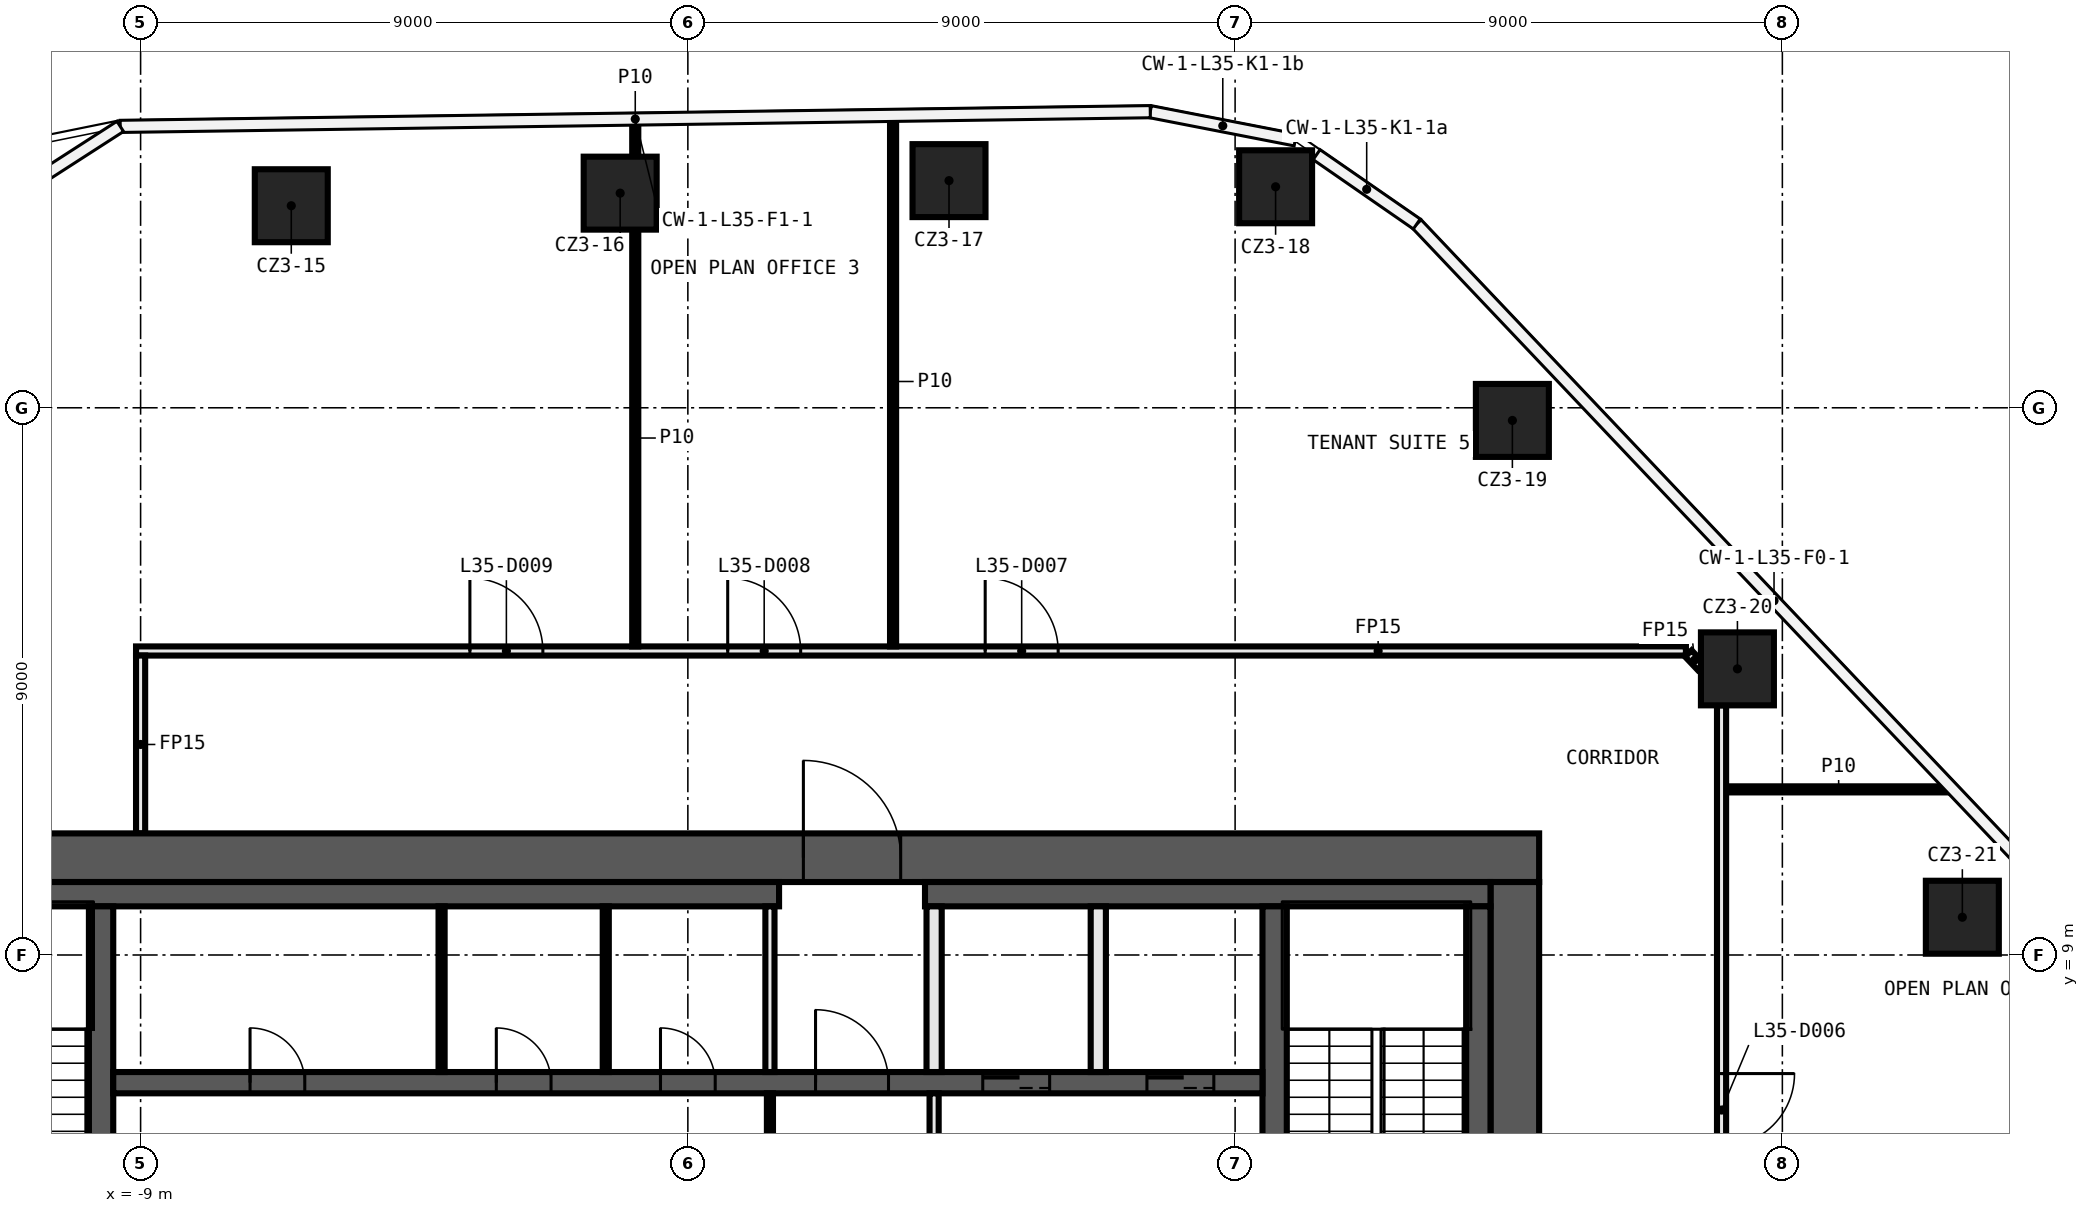
"""IFC4 building model, lengths in metres.
Left out: names, types, materials, properties, quantities, classifications, styles, units other than length and angle.
Written with IfcOpenShell. Run it as: python <this file> out.ifc"""

import sys

from ifc_helpers import new_model, si_unit, direction, frame, frame_2d, origin, origin_2d, place, context, subcontext, project, spatial, rectangle, extrude, element, fill, save


model = new_model("IFC4")
c1 = context("Model", 3, precision=1e-05, world=origin(), true_north=direction((0.0, 1.0)))
c2 = subcontext(c1, "Body", "Model", "MODEL_VIEW")
j1 = project(units=[si_unit("LENGTHUNIT", "METRE"), si_unit("PLANEANGLEUNIT", "RADIAN")], contexts=[c1])
p1 = place(None, origin())
s1 = spatial("IfcSite", under=j1, at=p1, CompositionType="ELEMENT")
p2 = place(p1, origin())
s2 = spatial("IfcBuilding", under=s1, at=p2, CompositionType="ELEMENT")
p3 = place(p2, frame((0.0, 0.0, 162.8)))
s3 = spatial("IfcBuildingStorey", under=s2, at=p3, CompositionType="ELEMENT", Elevation=162.8)
for number, where, z_axis, x_axis in (
    (1, (-6.522, 21.323, 0.0), (0.0, 0.0, 1.0), (1.0, 0.0, 0.0)),
    (2, (-1.113, 21.53, 0.0), (0.0, 0.0, 1.0), (1.0, 0.0, 0.0)),
    (3, (4.295, 21.736, 0.0), (0.0, 0.0, 1.0), (1.0, 0.0, 0.0)),
    (4, (9.666, 21.635, 0.0), (0.0, 0.0, 1.0), (1.0, 0.0, 0.0)),
    (5, (13.56, 17.792, 0.0), (0.0, 0.0, 1.0), (1.0, 0.0, 0.0)),
    (6, (17.261, 13.706, 0.0), (0.0, 0.0, 1.0), (1.0, 0.0, 0.0)),
    (7, (20.96, 9.621, 0.0), (0.0, 0.0, 1.0), (1.0, 0.0, 0.0)),
):
    element("IfcColumn", number, at=place(p3, frame(where, z_axis=z_axis, x_axis=x_axis)), inside=s3, PredefinedType="COLUMN", context=c2, shape_type="SweptSolid", body=[
        extrude(rectangle(XDim=1.2, YDim=1.2, at=origin_2d()), origin(), (0.0, 0.0, 1.0), 3.82),
    ])
p4 = place(p3, frame((17.075, 11.724, 0.0), z_axis=(0.0, 0.0, 1.0), x_axis=(1.0, 0.0, 0.0)))
e8 = element("IfcWall", 8, at=p4, inside=s3, PredefinedType="PARTITIONING", context=c2, shape_type="SweptSolid", body=[
    extrude(rectangle(XDim=3.701, YDim=0.1, at=frame_2d((1.851, 0.0))), origin(), (0.0, 0.0, 1.0), 3.82),
])
p5 = place(p3, frame((-9.075, 14.0, 0.0), z_axis=(0.0, 0.0, 1.0), x_axis=(1.0, 0.0, 0.0)))
e9 = element("IfcWall", 9, at=p5, inside=s3, PredefinedType="PARTITIONING", context=c2, shape_type="SweptSolid", body=[
    extrude(rectangle(XDim=25.489, YDim=0.15, at=frame_2d((12.745, 0.0))), origin(), (0.0, 0.0, 1.0), 3.82),
])
p6 = place(p5, frame((13.965, 0.0, 0.0)))
e10 = element("IfcOpeningElement", 10, at=p6, cuts=e9, PredefinedType="OPENING", context=c2, shape_type="SweptSolid", body=[
    extrude(rectangle(XDim=1.2, YDim=2.1, at=frame_2d((0.6, 1.05))), frame((0.0, 0.085, 0.0), z_axis=(0.0, -1.0, 0.0), x_axis=(1.0, 0.0, 0.0)), (0.0, 0.0, 1.0), 0.17),
])
p7 = place(p5, frame((9.73, 0.0, 0.0)))
e11 = element("IfcOpeningElement", 11, at=p7, cuts=e9, PredefinedType="OPENING", context=c2, shape_type="SweptSolid", body=[
    extrude(rectangle(XDim=1.2, YDim=2.1, at=frame_2d((0.6, 1.05))), frame((0.0, 0.085, 0.0), z_axis=(0.0, -1.0, 0.0), x_axis=(1.0, 0.0, 0.0)), (0.0, 0.0, 1.0), 0.17),
])
p8 = place(p5, frame((5.49, 0.0, 0.0)))
e12 = element("IfcOpeningElement", 12, at=p8, cuts=e9, PredefinedType="OPENING", context=c2, shape_type="SweptSolid", body=[
    extrude(rectangle(XDim=1.2, YDim=2.1, at=frame_2d((0.6, 1.05))), frame((0.0, 0.085, 0.0), z_axis=(0.0, -1.0, 0.0), x_axis=(1.0, 0.0, 0.0)), (0.0, 0.0, 1.0), 0.17),
])
p9 = place(p3, frame((17.0, 13.106, 0.0), z_axis=(0.0, 0.0, 1.0), x_axis=(0.0, -1.0, 0.0)))
e13 = element("IfcWall", 13, at=p9, inside=s3, PredefinedType="PARTITIONING", context=c2, shape_type="SweptSolid", body=[
    extrude(rectangle(XDim=23.172, YDim=0.15, at=frame_2d((11.586, 0.0))), origin(), (0.0, 0.0, 1.0), 3.82),
])
p10 = place(p9, frame((11.492, 0.0, 0.0)))
e14 = element("IfcOpeningElement", 14, at=p10, cuts=e13, PredefinedType="OPENING", context=c2, shape_type="SweptSolid", body=[
    extrude(rectangle(XDim=1.2, YDim=2.1, at=frame_2d((0.6, 1.05))), frame((0.0, 0.085, 0.0), z_axis=(0.0, -1.0, 0.0), x_axis=(1.0, 0.0, 0.0)), (0.0, 0.0, 1.0), 0.17),
])
p11 = place(p9, frame((6.056, 0.0, 0.0)))
e15 = element("IfcOpeningElement", 15, at=p11, cuts=e13, PredefinedType="OPENING", context=c2, shape_type="SweptSolid", body=[
    extrude(rectangle(XDim=1.2, YDim=2.1, at=frame_2d((0.6, 1.05))), frame((0.0, 0.085, 0.0), z_axis=(0.0, -1.0, 0.0), x_axis=(1.0, 0.0, 0.0)), (0.0, 0.0, 1.0), 0.17),
])
p12 = place(p3, frame((3.375, 14.075, 0.0), z_axis=(0.0, 0.0, 1.0), x_axis=(0.0, 1.0, 0.0)))
e16 = element("IfcWall", 16, at=p12, inside=s3, PredefinedType="PARTITIONING", context=c2, shape_type="SweptSolid", body=[
    extrude(rectangle(XDim=8.715, YDim=0.1, at=frame_2d((4.357, 0.0))), origin(), (0.0, 0.0, 1.0), 3.82),
])
p13 = place(p3, frame((-0.865, 14.075, 0.0), z_axis=(0.0, 0.0, 1.0), x_axis=(0.0, 1.0, 0.0)))
e17 = element("IfcWall", 17, at=p13, inside=s3, PredefinedType="PARTITIONING", context=c2, shape_type="SweptSolid", body=[
    extrude(rectangle(XDim=6.855, YDim=0.1, at=frame_2d((3.427, 0.0))), origin(), (0.0, 0.0, 1.0), 3.82),
])
p14 = place(p3, frame((-0.865, 22.13, 0.0), z_axis=(0.0, 0.0, 1.0), x_axis=(0.0, 1.0, 0.0)))
e18 = element("IfcWall", 18, at=p14, inside=s3, PredefinedType="PARTITIONING", context=c2, shape_type="SweptSolid", body=[
    extrude(rectangle(XDim=0.599, YDim=0.1, at=frame_2d((0.3, 0.0))), origin(), (0.0, 0.0, 1.0), 3.82),
])
p15 = place(p3, frame((-9.0, 11.0, 0.0), z_axis=(0.0, 0.0, 1.0), x_axis=(0.0, 1.0, 0.0)))
e19 = element("IfcWall", 19, at=p15, inside=s3, PredefinedType="PARTITIONING", context=c2, shape_type="SweptSolid", body=[
    extrude(rectangle(XDim=2.925, YDim=0.15, at=frame_2d((1.462, 0.0))), origin(), (0.0, 0.0, 1.0), 3.82),
])
p16 = place(p3, frame((16.453, 13.959, 0.0), z_axis=(0.0, 0.0, 1.0), x_axis=(0.687856738642, -0.725846476264, 0.0)))
e20 = element("IfcWall", 20, at=p16, inside=s3, PredefinedType="PARTITIONING", context=c2, shape_type="SweptSolid", body=[
    extrude(rectangle(XDim=0.302, YDim=0.15, at=frame_2d((0.151, 0.0))), origin(), (0.0, 0.0, 1.0), 3.82),
])
p17 = place(p3, frame((-14.0, 10.6, 0.0), z_axis=(0.0, 0.0, 1.0), x_axis=(1.0, 0.0, 0.0)))
e21 = element("IfcWall", 21, at=p17, inside=s3, PredefinedType="SHEAR", context=c2, shape_type="SweptSolid", body=[
    extrude(rectangle(XDim=28.0, YDim=0.8, at=frame_2d((14.0, 0.0))), origin(), (0.0, 0.0, 1.0), 3.82),
])
p18 = place(p17, frame((15.9, 0.0, 0.0)))
e22 = element("IfcOpeningElement", 22, at=p18, cuts=e21, PredefinedType="OPENING", context=c2, shape_type="SweptSolid", body=[
    extrude(rectangle(XDim=1.6, YDim=2.1, at=frame_2d((0.8, 1.05))), frame((0.0, 0.41, 0.0), z_axis=(0.0, -1.0, 0.0), x_axis=(1.0, 0.0, 0.0)), (0.0, 0.0, 1.0), 0.82),
])
p19 = place(p3, frame((13.6, 10.2, 0.0), z_axis=(0.0, 0.0, 1.0), x_axis=(0.0, -1.0, 0.0)))
e23 = element("IfcWall", 23, at=p19, inside=s3, PredefinedType="SHEAR", context=c2, shape_type="SweptSolid", body=[
    extrude(rectangle(XDim=20.4, YDim=0.8, at=frame_2d((10.2, 0.0))), origin(), (0.0, 0.0, 1.0), 3.82),
])
p20 = place(p3, frame((-13.2, 10.0, 0.0), z_axis=(0.0, 0.0, 1.0), x_axis=(1.0, 0.0, 0.0)))
e24 = element("IfcWall", 24, at=p20, inside=s3, PredefinedType="SHEAR", context=c2, shape_type="SweptSolid", body=[
    extrude(rectangle(XDim=14.7, YDim=0.4, at=frame_2d((7.35, 0.0))), origin(), (0.0, 0.0, 1.0), 3.82),
])
p21 = place(p3, frame((3.9, 10.0, 0.0), z_axis=(0.0, 0.0, 1.0), x_axis=(1.0, 0.0, 0.0)))
e25 = element("IfcWall", 25, at=p21, inside=s3, PredefinedType="SHEAR", context=c2, shape_type="SweptSolid", body=[
    extrude(rectangle(XDim=9.3, YDim=0.4, at=frame_2d((4.65, 0.0))), origin(), (0.0, 0.0, 1.0), 3.82),
])
p22 = place(p3, frame((13.0, 9.8, 0.0), z_axis=(0.0, 0.0, 1.0), x_axis=(0.0, -1.0, 0.0)))
e26 = element("IfcWall", 26, at=p22, inside=s3, PredefinedType="SHEAR", context=c2, shape_type="SweptSolid", body=[
    extrude(rectangle(XDim=19.6, YDim=0.4, at=frame_2d((9.8, 0.0))), origin(), (0.0, 0.0, 1.0), 3.82),
])
p23 = place(p3, frame((9.65, 9.8, 0.0), z_axis=(0.0, 0.0, 1.0), x_axis=(0.0, -1.0, 0.0)))
e27 = element("IfcWall", 27, at=p23, inside=s3, PredefinedType="SHEAR", context=c2, shape_type="SweptSolid", body=[
    extrude(rectangle(XDim=7.5, YDim=0.4, at=frame_2d((3.75, 0.0))), origin(), (0.0, 0.0, 1.0), 3.82),
])
p24 = place(p23, frame((5.1, 0.0, 0.0)))
e28 = element("IfcOpeningElement", 28, at=p24, cuts=e27, PredefinedType="OPENING", context=c2, shape_type="SweptSolid", body=[
    extrude(rectangle(XDim=1.2, YDim=2.1, at=frame_2d((0.6, 1.05))), frame((0.0, 0.21, 0.0), z_axis=(0.0, -1.0, 0.0), x_axis=(1.0, 0.0, 0.0)), (0.0, 0.0, 1.0), 0.42),
])
p25 = place(p3, frame((-9.65, 2.3, 0.0), z_axis=(0.0, 0.0, 1.0), x_axis=(0.0, 1.0, 0.0)))
e29 = element("IfcWall", 29, at=p25, inside=s3, PredefinedType="SHEAR", context=c2, shape_type="SweptSolid", body=[
    extrude(rectangle(XDim=7.5, YDim=0.4, at=frame_2d((3.75, 0.0))), origin(), (0.0, 0.0, 1.0), 3.82),
])
p26 = place(p25, frame((1.2, 0.0, 0.0)))
e30 = element("IfcOpeningElement", 30, at=p26, cuts=e29, PredefinedType="OPENING", context=c2, shape_type="SweptSolid", body=[
    extrude(rectangle(XDim=1.2, YDim=2.1, at=frame_2d((0.6, 1.05))), frame((0.0, 0.21, 0.0), z_axis=(0.0, -1.0, 0.0), x_axis=(1.0, 0.0, 0.0)), (0.0, 0.0, 1.0), 0.42),
])
p27 = place(p3, frame((-9.45, 6.9, 0.0), z_axis=(0.0, 0.0, 1.0), x_axis=(1.0, 0.0, 0.0)))
e31 = element("IfcWall", 31, at=p27, inside=s3, PredefinedType="SHEAR", context=c2, shape_type="SweptSolid", body=[
    extrude(rectangle(XDim=18.9, YDim=0.35, at=frame_2d((9.45, 0.0))), origin(), (0.0, 0.0, 1.0), 3.82),
])
p28 = place(p27, frame((11.55, 0.0, 0.0)))
e32 = element("IfcOpeningElement", 32, at=p28, cuts=e31, PredefinedType="OPENING", context=c2, shape_type="SweptSolid", body=[
    extrude(rectangle(XDim=1.2, YDim=2.1, at=frame_2d((0.6, 1.05))), frame((0.0, 0.185, 0.0), z_axis=(0.0, -1.0, 0.0), x_axis=(1.0, 0.0, 0.0)), (0.0, 0.0, 1.0), 0.37),
])
p29 = place(p27, frame((14.3, 0.0, 0.0)))
e33 = element("IfcOpeningElement", 33, at=p29, cuts=e31, PredefinedType="OPENING", context=c2, shape_type="SweptSolid", body=[
    extrude(rectangle(XDim=1.1, YDim=2.1, at=frame_2d((0.55, 1.05))), frame((0.0, 0.185, 0.0), z_axis=(0.0, -1.0, 0.0), x_axis=(1.0, 0.0, 0.0)), (0.0, 0.0, 1.0), 0.37),
])
p30 = place(p27, frame((17.0, 0.0, 0.0)))
e34 = element("IfcOpeningElement", 34, at=p30, cuts=e31, PredefinedType="OPENING", context=c2, shape_type="SweptSolid", body=[
    extrude(rectangle(XDim=1.1, YDim=2.1, at=frame_2d((0.55, 1.05))), frame((0.0, 0.185, 0.0), z_axis=(0.0, -1.0, 0.0), x_axis=(1.0, 0.0, 0.0)), (0.0, 0.0, 1.0), 0.37),
])
p31 = place(p27, frame((2.25, 0.0, 0.0)))
e35 = element("IfcOpeningElement", 35, at=p31, cuts=e31, PredefinedType="OPENING", context=c2, shape_type="SweptSolid", body=[
    extrude(rectangle(XDim=0.9, YDim=2.1, at=frame_2d((0.45, 1.05))), frame((0.0, 0.185, 0.0), z_axis=(0.0, -1.0, 0.0), x_axis=(1.0, 0.0, 0.0)), (0.0, 0.0, 1.0), 0.37),
])
p32 = place(p27, frame((6.3, 0.0, 0.0)))
e36 = element("IfcOpeningElement", 36, at=p32, cuts=e31, PredefinedType="OPENING", context=c2, shape_type="SweptSolid", body=[
    extrude(rectangle(XDim=0.9, YDim=2.1, at=frame_2d((0.45, 1.05))), frame((0.0, 0.185, 0.0), z_axis=(0.0, -1.0, 0.0), x_axis=(1.0, 0.0, 0.0)), (0.0, 0.0, 1.0), 0.37),
])
p33 = place(p27, frame((9.0, 0.0, 0.0)))
e37 = element("IfcOpeningElement", 37, at=p33, cuts=e31, PredefinedType="OPENING", context=c2, shape_type="SweptSolid", body=[
    extrude(rectangle(XDim=0.9, YDim=2.1, at=frame_2d((0.45, 1.05))), frame((0.0, 0.185, 0.0), z_axis=(0.0, -1.0, 0.0), x_axis=(1.0, 0.0, 0.0)), (0.0, 0.0, 1.0), 0.37),
])
p34 = place(p3, frame((6.75, 7.075, 0.0), z_axis=(0.0, 0.0, 1.0), x_axis=(0.0, 1.0, 0.0)))
e38 = element("IfcWall", 38, at=p34, inside=s3, PredefinedType="SOLIDWALL", context=c2, shape_type="SweptSolid", body=[
    extrude(rectangle(XDim=2.725, YDim=0.25, at=frame_2d((1.363, 0.0))), origin(), (0.0, 0.0, 1.0), 3.82),
])
p35 = place(p3, frame((4.05, 6.725, 0.0), z_axis=(0.0, 0.0, 1.0), x_axis=(0.0, -1.0, 0.0)))
e39 = element("IfcWall", 39, at=p35, inside=s3, PredefinedType="PARTITIONING", context=c2, shape_type="SweptSolid", body=[
    extrude(rectangle(XDim=3.25, YDim=0.15, at=frame_2d((1.625, 0.0))), origin(), (0.0, 0.0, 1.0), 3.82),
])
p36 = place(p35, frame((1.025, 0.0, 0.0)))
e40 = element("IfcOpeningElement", 40, at=p36, cuts=e39, PredefinedType="OPENING", context=c2, shape_type="SweptSolid", body=[
    extrude(rectangle(XDim=1.2, YDim=2.1, at=frame_2d((0.6, 1.05))), frame((0.0, 0.085, 0.0), z_axis=(0.0, -1.0, 0.0), x_axis=(1.0, 0.0, 0.0)), (0.0, 0.0, 1.0), 0.17),
])
p37 = place(p3, frame((4.05, 7.075, 0.0), z_axis=(0.0, 0.0, 1.0), x_axis=(0.0, 1.0, 0.0)))
e41 = element("IfcWall", 41, at=p37, inside=s3, PredefinedType="SOLIDWALL", context=c2, shape_type="SweptSolid", body=[
    extrude(rectangle(XDim=2.725, YDim=0.25, at=frame_2d((1.363, 0.0))), origin(), (0.0, 0.0, 1.0), 3.82),
])
p38 = place(p3, frame((1.35, 7.075, 0.0), z_axis=(0.0, 0.0, 1.0), x_axis=(0.0, 1.0, 0.0)))
e42 = element("IfcWall", 42, at=p38, inside=s3, PredefinedType="PARTITIONING", context=c2, shape_type="SweptSolid", body=[
    extrude(rectangle(XDim=2.725, YDim=0.15, at=frame_2d((1.363, 0.0))), origin(), (0.0, 0.0, 1.0), 3.82),
])
p39 = place(p3, frame((1.35, 6.725, 0.0), z_axis=(0.0, 0.0, 1.0), x_axis=(0.0, -1.0, 0.0)))
e43 = element("IfcWall", 43, at=p39, inside=s3, PredefinedType="PARTITIONING", context=c2, shape_type="SweptSolid", body=[
    extrude(rectangle(XDim=3.25, YDim=0.1, at=frame_2d((1.625, 0.0))), origin(), (0.0, 0.0, 1.0), 3.82),
])
p40 = place(p39, frame((1.025, 0.0, 0.0)))
e44 = element("IfcOpeningElement", 44, at=p40, cuts=e43, PredefinedType="OPENING", context=c2, shape_type="SweptSolid", body=[
    extrude(rectangle(XDim=1.2, YDim=2.1, at=frame_2d((0.6, 1.05))), frame((0.0, 0.06, 0.0), z_axis=(0.0, -1.0, 0.0), x_axis=(1.0, 0.0, 0.0)), (0.0, 0.0, 1.0), 0.12),
])
for number, where, z_axis, x_axis in (
    (45, (-1.35, 7.075, 0.0), (0.0, 0.0, 1.0), (0.0, 1.0, 0.0)),
    (46, (-4.05, 7.075, 0.0), (0.0, 0.0, 1.0), (0.0, 1.0, 0.0)),
):
    element("IfcWall", number, at=place(p3, frame(where, z_axis=z_axis, x_axis=x_axis)), inside=s3, PredefinedType="PARTITIONING", context=c2, shape_type="SweptSolid", body=[
        extrude(rectangle(XDim=2.725, YDim=0.1, at=frame_2d((1.363, 0.0))), origin(), (0.0, 0.0, 1.0), 3.82),
    ])
p41 = place(p11, origin())
e47 = element("IfcDoor", 47, at=p41, inside=s3, OperationType="SINGLE_SWING_LEFT", PredefinedType="DOOR", context=c2, shape_type="SweptSolid", body=[
    extrude(rectangle(XDim=1.2, YDim=2.1, at=frame_2d((0.6, 1.05))), frame((0.0, 0.025, 0.0), z_axis=(0.0, -1.0, 0.0), x_axis=(1.0, 0.0, 0.0)), (0.0, 0.0, 1.0), 0.05),
])
fill(e15, e47)
p42 = place(p6, origin())
e48 = element("IfcDoor", 48, at=p42, inside=s3, OperationType="SINGLE_SWING_RIGHT", PredefinedType="DOOR", context=c2, shape_type="SweptSolid", body=[
    extrude(rectangle(XDim=1.2, YDim=2.1, at=frame_2d((0.6, 1.05))), frame((0.0, 0.025, 0.0), z_axis=(0.0, -1.0, 0.0), x_axis=(1.0, 0.0, 0.0)), (0.0, 0.0, 1.0), 0.05),
])
fill(e10, e48)
p43 = place(p7, origin())
e49 = element("IfcDoor", 49, at=p43, inside=s3, OperationType="SINGLE_SWING_LEFT", PredefinedType="DOOR", context=c2, shape_type="SweptSolid", body=[
    extrude(rectangle(XDim=1.2, YDim=2.1, at=frame_2d((0.6, 1.05))), frame((0.0, 0.025, 0.0), z_axis=(0.0, -1.0, 0.0), x_axis=(1.0, 0.0, 0.0)), (0.0, 0.0, 1.0), 0.05),
])
fill(e11, e49)
p44 = place(p8, origin())
e50 = element("IfcDoor", 50, at=p44, inside=s3, OperationType="SINGLE_SWING_RIGHT", PredefinedType="DOOR", context=c2, shape_type="SweptSolid", body=[
    extrude(rectangle(XDim=1.2, YDim=2.1, at=frame_2d((0.6, 1.05))), frame((0.0, 0.025, 0.0), z_axis=(0.0, -1.0, 0.0), x_axis=(1.0, 0.0, 0.0)), (0.0, 0.0, 1.0), 0.05),
])
fill(e12, e50)
p45 = place(p18, origin())
e51 = element("IfcDoor", 51, at=p45, inside=s3, OperationType="DOUBLE_DOOR_SINGLE_SWING", PredefinedType="DOOR", context=c2, shape_type="SweptSolid", body=[
    extrude(rectangle(XDim=1.6, YDim=2.1, at=frame_2d((0.8, 1.05))), frame((0.0, 0.025, 0.0), z_axis=(0.0, -1.0, 0.0), x_axis=(1.0, 0.0, 0.0)), (0.0, 0.0, 1.0), 0.05),
])
fill(e22, e51)
p46 = place(p28, origin())
e52 = element("IfcDoor", 52, at=p46, inside=s3, OperationType="SINGLE_SWING_LEFT", PredefinedType="DOOR", context=c2, shape_type="SweptSolid", body=[
    extrude(rectangle(XDim=1.2, YDim=2.1, at=frame_2d((0.6, 1.05))), frame((0.0, 0.025, 0.0), z_axis=(0.0, -1.0, 0.0), x_axis=(1.0, 0.0, 0.0)), (0.0, 0.0, 1.0), 0.05),
])
fill(e32, e52)
p47 = place(p29, origin())
e53 = element("IfcDoor", 53, at=p47, inside=s3, OperationType="DOUBLE_DOOR_SLIDING", PredefinedType="DOOR", context=c2, shape_type="SweptSolid", body=[
    extrude(rectangle(XDim=1.1, YDim=2.1, at=frame_2d((0.55, 1.05))), frame((0.0, 0.025, 0.0), z_axis=(0.0, -1.0, 0.0), x_axis=(1.0, 0.0, 0.0)), (0.0, 0.0, 1.0), 0.05),
])
fill(e33, e53)
p48 = place(p30, origin())
e54 = element("IfcDoor", 54, at=p48, inside=s3, OperationType="DOUBLE_DOOR_SLIDING", PredefinedType="DOOR", context=c2, shape_type="SweptSolid", body=[
    extrude(rectangle(XDim=1.1, YDim=2.1, at=frame_2d((0.55, 1.05))), frame((0.0, 0.025, 0.0), z_axis=(0.0, -1.0, 0.0), x_axis=(1.0, 0.0, 0.0)), (0.0, 0.0, 1.0), 0.05),
])
fill(e34, e54)
p49 = place(p31, origin())
e55 = element("IfcDoor", 55, at=p49, inside=s3, OperationType="SINGLE_SWING_RIGHT", PredefinedType="DOOR", context=c2, shape_type="SweptSolid", body=[
    extrude(rectangle(XDim=0.9, YDim=2.1, at=frame_2d((0.45, 1.05))), frame((0.0, 0.025, 0.0), z_axis=(0.0, -1.0, 0.0), x_axis=(1.0, 0.0, 0.0)), (0.0, 0.0, 1.0), 0.05),
])
fill(e35, e55)
p50 = place(p32, origin())
e56 = element("IfcDoor", 56, at=p50, inside=s3, OperationType="SINGLE_SWING_LEFT", PredefinedType="DOOR", context=c2, shape_type="SweptSolid", body=[
    extrude(rectangle(XDim=0.9, YDim=2.1, at=frame_2d((0.45, 1.05))), frame((0.0, 0.025, 0.0), z_axis=(0.0, -1.0, 0.0), x_axis=(1.0, 0.0, 0.0)), (0.0, 0.0, 1.0), 0.05),
])
fill(e36, e56)
p51 = place(p33, origin())
e57 = element("IfcDoor", 57, at=p51, inside=s3, OperationType="SINGLE_SWING_RIGHT", PredefinedType="DOOR", context=c2, shape_type="SweptSolid", body=[
    extrude(rectangle(XDim=0.9, YDim=2.1, at=frame_2d((0.45, 1.05))), frame((0.0, 0.025, 0.0), z_axis=(0.0, -1.0, 0.0), x_axis=(1.0, 0.0, 0.0)), (0.0, 0.0, 1.0), 0.05),
])
fill(e37, e57)
save(model, sys.argv[1])
